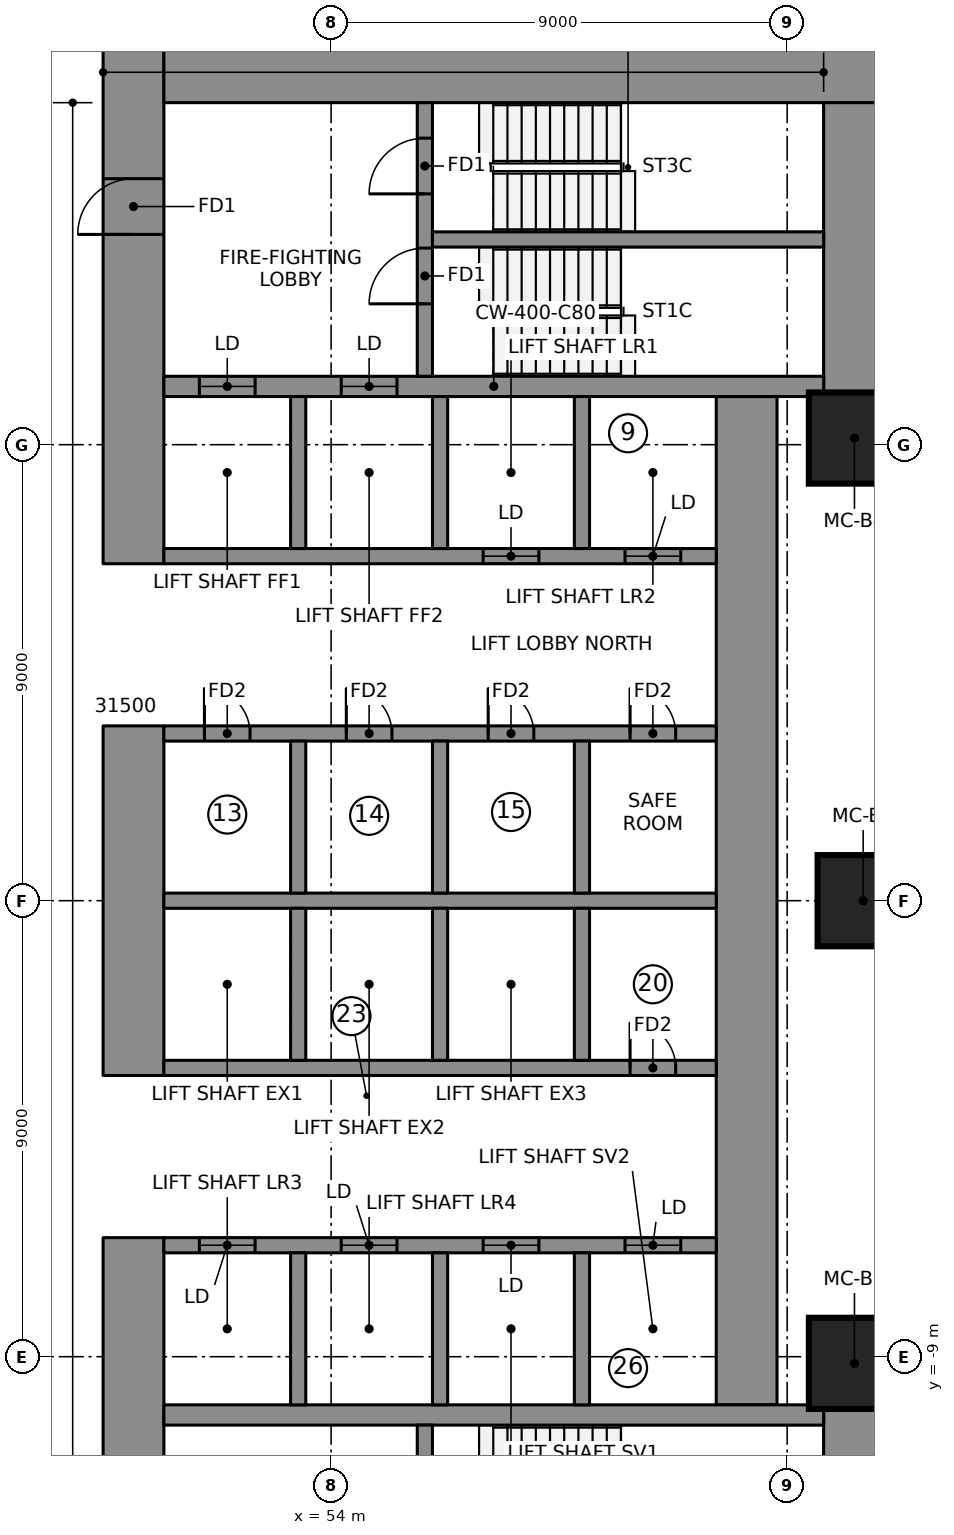
"""IFC4 building model, lengths in metres.
Left out: names, types, materials, properties, quantities, classifications, styles, units other than length and angle.
Written with IfcOpenShell. Run it as: python <this file> out.ifc"""

import sys

from ifc_helpers import new_model, si_unit, direction, frame, frame_2d, origin, origin_2d, place, context, subcontext, project, spatial, rectangle, extrude, element, fill, save


model = new_model("IFC4")
c1 = context("Model", 3, precision=1e-05, world=origin(), true_north=direction((0.0, 1.0)))
c2 = subcontext(c1, "Body", "Model", "MODEL_VIEW")
j1 = project(units=[si_unit("LENGTHUNIT", "METRE"), si_unit("PLANEANGLEUNIT", "RADIAN")], contexts=[c1])
p1 = place(None, origin())
s1 = spatial("IfcSite", under=j1, at=p1, CompositionType="ELEMENT")
p2 = place(p1, origin())
s2 = spatial("IfcBuilding", under=s1, at=p2, CompositionType="ELEMENT")
p3 = place(p2, frame((0.0, 0.0, 53.8)))
s3 = spatial("IfcBuildingStorey", under=s2, at=p3, CompositionType="ELEMENT", Elevation=53.8)
p4 = place(p3, frame((50.1, 6.65, 0.0), z_axis=(0.0, 0.0, 1.0), x_axis=(0.0, 1.0, 0.0)))
e1 = element("IfcWall", 1, at=p4, inside=s3, PredefinedType="SHEAR", context=c2, shape_type="SweptSolid", body=[
    extrude(rectangle(XDim=10.3, YDim=1.2, at=frame_2d((5.15, 0.0))), origin(), (0.0, 0.0, 1.0), 3.55),
])
p5 = place(p4, frame((6.5, 0.0, 0.0)))
e2 = element("IfcOpeningElement", 2, at=p5, cuts=e1, PredefinedType="OPENING", context=c2, shape_type="SweptSolid", body=[
    extrude(rectangle(XDim=1.1, YDim=2.1, at=frame_2d((0.55, 1.05))), frame((0.0, 0.61, 0.0), z_axis=(0.0, -1.0, 0.0), x_axis=(1.0, 0.0, 0.0)), (0.0, 0.0, 1.0), 1.22),
])
p6 = place(p3, frame((50.1, -3.45, 0.0), z_axis=(0.0, 0.0, 1.0), x_axis=(0.0, 1.0, 0.0)))
e3 = element("IfcWall", 3, at=p6, inside=s3, PredefinedType="SHEAR", context=c2, shape_type="SweptSolid", body=[
    extrude(rectangle(XDim=6.9, YDim=1.2, at=frame_2d((3.45, 0.0))), origin(), (0.0, 0.0, 1.0), 3.55),
])
p7 = place(p3, frame((50.1, -16.95, 0.0), z_axis=(0.0, 0.0, 1.0), x_axis=(0.0, 1.0, 0.0)))
e4 = element("IfcWall", 4, at=p7, inside=s3, PredefinedType="SHEAR", context=c2, shape_type="SweptSolid", body=[
    extrude(rectangle(XDim=10.3, YDim=1.2, at=frame_2d((5.15, 0.0))), origin(), (0.0, 0.0, 1.0), 3.55),
])
p8 = place(p7, frame((2.7, 0.0, 0.0)))
e5 = element("IfcOpeningElement", 5, at=p8, cuts=e4, PredefinedType="OPENING", context=c2, shape_type="SweptSolid", body=[
    extrude(rectangle(XDim=1.1, YDim=2.1, at=frame_2d((0.55, 1.05))), frame((0.0, 0.61, 0.0), z_axis=(0.0, -1.0, 0.0), x_axis=(1.0, 0.0, 0.0)), (0.0, 0.0, 1.0), 1.22),
])
p9 = place(p3, frame((50.7, 16.35, 0.0), z_axis=(0.0, 0.0, 1.0), x_axis=(1.0, 0.0, 0.0)))
e6 = element("IfcWall", 6, at=p9, inside=s3, PredefinedType="SHEAR", context=c2, shape_type="SweptSolid", body=[
    extrude(rectangle(XDim=14.22, YDim=1.2, at=frame_2d((7.11, 0.0))), origin(), (0.0, 0.0, 1.0), 3.55),
])
for number, where, z_axis, x_axis in (
    (7, (64.32, 9.95, 0.0), (0.0, 0.0, 1.0), (0.0, 1.0, 0.0)),
    (8, (64.32, -15.75, 0.0), (0.0, 0.0, 1.0), (0.0, 1.0, 0.0)),
):
    element("IfcWall", number, at=place(p3, frame(where, z_axis=z_axis, x_axis=x_axis)), inside=s3, PredefinedType="SHEAR", context=c2, shape_type="SweptSolid", body=[
        extrude(rectangle(XDim=5.8, YDim=1.2, at=frame_2d((2.9, 0.0))), origin(), (0.0, 0.0, 1.0), 3.55),
    ])
p10 = place(p3, frame((62.2, -9.95, 0.0), z_axis=(0.0, 0.0, 1.0), x_axis=(0.0, 1.0, 0.0)))
e9 = element("IfcWall", 9, at=p10, inside=s3, PredefinedType="SHEAR", context=c2, shape_type="SweptSolid", body=[
    extrude(rectangle(XDim=19.9, YDim=1.2, at=frame_2d((9.95, 0.0))), origin(), (0.0, 0.0, 1.0), 3.55),
])
p11 = place(p3, frame((50.7, 10.15, 0.0), z_axis=(0.0, 0.0, 1.0), x_axis=(1.0, 0.0, 0.0)))
e10 = element("IfcWall", 10, at=p11, inside=s3, PredefinedType="SHEAR", context=c2, shape_type="SweptSolid", body=[
    extrude(rectangle(XDim=13.02, YDim=0.4, at=frame_2d((6.51, 0.0))), origin(), (0.0, 0.0, 1.0), 3.55),
])
p12 = place(p11, frame((0.7, 0.0, 0.0)))
e11 = element("IfcOpeningElement", 11, at=p12, cuts=e10, PredefinedType="OPENING", context=c2, shape_type="SweptSolid", body=[
    extrude(rectangle(XDim=1.1, YDim=2.1, at=frame_2d((0.55, 1.05))), frame((0.0, 0.21, 0.0), z_axis=(0.0, -1.0, 0.0), x_axis=(1.0, 0.0, 0.0)), (0.0, 0.0, 1.0), 0.42),
])
p13 = place(p11, frame((3.5, 0.0, 0.0)))
e12 = element("IfcOpeningElement", 12, at=p13, cuts=e10, PredefinedType="OPENING", context=c2, shape_type="SweptSolid", body=[
    extrude(rectangle(XDim=1.1, YDim=2.1, at=frame_2d((0.55, 1.05))), frame((0.0, 0.21, 0.0), z_axis=(0.0, -1.0, 0.0), x_axis=(1.0, 0.0, 0.0)), (0.0, 0.0, 1.0), 0.42),
])
p14 = place(p3, frame((50.7, -10.15, 0.0), z_axis=(0.0, 0.0, 1.0), x_axis=(1.0, 0.0, 0.0)))
e13 = element("IfcWall", 13, at=p14, inside=s3, PredefinedType="SHEAR", context=c2, shape_type="SweptSolid", body=[
    extrude(rectangle(XDim=13.02, YDim=0.4, at=frame_2d((6.51, 0.0))), origin(), (0.0, 0.0, 1.0), 3.55),
])
p15 = place(p3, frame((50.7, 0.0, 0.0), z_axis=(0.0, 0.0, 1.0), x_axis=(1.0, 0.0, 0.0)))
e14 = element("IfcWall", 14, at=p15, inside=s3, PredefinedType="SHEAR", context=c2, shape_type="SweptSolid", body=[
    extrude(rectangle(XDim=10.9, YDim=0.3, at=frame_2d((5.45, 0.0))), origin(), (0.0, 0.0, 1.0), 3.55),
])
p16 = place(p3, frame((50.7, 3.3, 0.0), z_axis=(0.0, 0.0, 1.0), x_axis=(1.0, 0.0, 0.0)))
e15 = element("IfcWall", 15, at=p16, inside=s3, PredefinedType="SHEAR", context=c2, shape_type="SweptSolid", body=[
    extrude(rectangle(XDim=10.9, YDim=0.3, at=frame_2d((5.45, 0.0))), origin(), (0.0, 0.0, 1.0), 3.55),
])
p17 = place(p16, frame((0.8, 0.0, 0.0)))
e16 = element("IfcOpeningElement", 16, at=p17, cuts=e15, PredefinedType="OPENING", context=c2, shape_type="SweptSolid", body=[
    extrude(rectangle(XDim=0.9, YDim=2.1, at=frame_2d((0.45, 1.05))), frame((0.0, 0.16, 0.0), z_axis=(0.0, -1.0, 0.0), x_axis=(1.0, 0.0, 0.0)), (0.0, 0.0, 1.0), 0.32),
])
p18 = place(p16, frame((3.6, 0.0, 0.0)))
e17 = element("IfcOpeningElement", 17, at=p18, cuts=e15, PredefinedType="OPENING", context=c2, shape_type="SweptSolid", body=[
    extrude(rectangle(XDim=0.9, YDim=2.1, at=frame_2d((0.45, 1.05))), frame((0.0, 0.16, 0.0), z_axis=(0.0, -1.0, 0.0), x_axis=(1.0, 0.0, 0.0)), (0.0, 0.0, 1.0), 0.32),
])
p19 = place(p16, frame((6.4, 0.0, 0.0)))
e18 = element("IfcOpeningElement", 18, at=p19, cuts=e15, PredefinedType="OPENING", context=c2, shape_type="SweptSolid", body=[
    extrude(rectangle(XDim=0.9, YDim=2.1, at=frame_2d((0.45, 1.05))), frame((0.0, 0.16, 0.0), z_axis=(0.0, -1.0, 0.0), x_axis=(1.0, 0.0, 0.0)), (0.0, 0.0, 1.0), 0.32),
])
p20 = place(p16, frame((9.2, 0.0, 0.0)))
e19 = element("IfcOpeningElement", 19, at=p20, cuts=e15, PredefinedType="OPENING", context=c2, shape_type="SweptSolid", body=[
    extrude(rectangle(XDim=0.9, YDim=2.1, at=frame_2d((0.45, 1.05))), frame((0.0, 0.16, 0.0), z_axis=(0.0, -1.0, 0.0), x_axis=(1.0, 0.0, 0.0)), (0.0, 0.0, 1.0), 0.32),
])
p21 = place(p3, frame((50.7, 6.8, 0.0), z_axis=(0.0, 0.0, 1.0), x_axis=(1.0, 0.0, 0.0)))
e20 = element("IfcWall", 20, at=p21, inside=s3, PredefinedType="SHEAR", context=c2, shape_type="SweptSolid", body=[
    extrude(rectangle(XDim=10.9, YDim=0.3, at=frame_2d((5.45, 0.0))), origin(), (0.0, 0.0, 1.0), 3.55),
])
p22 = place(p21, frame((6.3, 0.0, 0.0)))
e21 = element("IfcOpeningElement", 21, at=p22, cuts=e20, PredefinedType="OPENING", context=c2, shape_type="SweptSolid", body=[
    extrude(rectangle(XDim=1.1, YDim=2.1, at=frame_2d((0.55, 1.05))), frame((0.0, 0.16, 0.0), z_axis=(0.0, -1.0, 0.0), x_axis=(1.0, 0.0, 0.0)), (0.0, 0.0, 1.0), 0.32),
])
p23 = place(p21, frame((9.1, 0.0, 0.0)))
e22 = element("IfcOpeningElement", 22, at=p23, cuts=e20, PredefinedType="OPENING", context=c2, shape_type="SweptSolid", body=[
    extrude(rectangle(XDim=1.1, YDim=2.1, at=frame_2d((0.55, 1.05))), frame((0.0, 0.16, 0.0), z_axis=(0.0, -1.0, 0.0), x_axis=(1.0, 0.0, 0.0)), (0.0, 0.0, 1.0), 0.32),
])
for number, where, z_axis, x_axis in (
    (23, (53.35, 0.15, 0.0), (0.0, 0.0, 1.0), (0.0, 1.0, 0.0)),
    (24, (53.35, 6.95, 0.0), (0.0, 0.0, 1.0), (0.0, 1.0, 0.0)),
    (25, (56.15, 0.15, 0.0), (0.0, 0.0, 1.0), (0.0, 1.0, 0.0)),
    (26, (56.15, 6.95, 0.0), (0.0, 0.0, 1.0), (0.0, 1.0, 0.0)),
    (27, (58.95, 0.15, 0.0), (0.0, 0.0, 1.0), (0.0, 1.0, 0.0)),
    (28, (58.95, 6.95, 0.0), (0.0, 0.0, 1.0), (0.0, 1.0, 0.0)),
):
    element("IfcWall", number, at=place(p3, frame(where, z_axis=z_axis, x_axis=x_axis)), inside=s3, PredefinedType="SHEAR", context=c2, shape_type="SweptSolid", body=[
        extrude(rectangle(XDim=3.0, YDim=0.3, at=frame_2d((1.5, 0.0))), origin(), (0.0, 0.0, 1.0), 3.55),
    ])
p24 = place(p3, frame((50.7, -3.3, 0.0), z_axis=(0.0, 0.0, 1.0), x_axis=(1.0, 0.0, 0.0)))
e29 = element("IfcWall", 29, at=p24, inside=s3, PredefinedType="SHEAR", context=c2, shape_type="SweptSolid", body=[
    extrude(rectangle(XDim=10.9, YDim=0.3, at=frame_2d((5.45, 0.0))), origin(), (0.0, 0.0, 1.0), 3.55),
])
p25 = place(p24, frame((9.2, 0.0, 0.0)))
e30 = element("IfcOpeningElement", 30, at=p25, cuts=e29, PredefinedType="OPENING", context=c2, shape_type="SweptSolid", body=[
    extrude(rectangle(XDim=0.9, YDim=2.1, at=frame_2d((0.45, 1.05))), frame((0.0, 0.16, 0.0), z_axis=(0.0, -1.0, 0.0), x_axis=(1.0, 0.0, 0.0)), (0.0, 0.0, 1.0), 0.32),
])
p26 = place(p3, frame((50.7, -6.8, 0.0), z_axis=(0.0, 0.0, 1.0), x_axis=(1.0, 0.0, 0.0)))
e31 = element("IfcWall", 31, at=p26, inside=s3, PredefinedType="SHEAR", context=c2, shape_type="SweptSolid", body=[
    extrude(rectangle(XDim=10.9, YDim=0.3, at=frame_2d((5.45, 0.0))), origin(), (0.0, 0.0, 1.0), 3.55),
])
p27 = place(p26, frame((0.7, 0.0, 0.0)))
e32 = element("IfcOpeningElement", 32, at=p27, cuts=e31, PredefinedType="OPENING", context=c2, shape_type="SweptSolid", body=[
    extrude(rectangle(XDim=1.1, YDim=2.1, at=frame_2d((0.55, 1.05))), frame((0.0, 0.16, 0.0), z_axis=(0.0, -1.0, 0.0), x_axis=(1.0, 0.0, 0.0)), (0.0, 0.0, 1.0), 0.32),
])
p28 = place(p26, frame((3.5, 0.0, 0.0)))
e33 = element("IfcOpeningElement", 33, at=p28, cuts=e31, PredefinedType="OPENING", context=c2, shape_type="SweptSolid", body=[
    extrude(rectangle(XDim=1.1, YDim=2.1, at=frame_2d((0.55, 1.05))), frame((0.0, 0.16, 0.0), z_axis=(0.0, -1.0, 0.0), x_axis=(1.0, 0.0, 0.0)), (0.0, 0.0, 1.0), 0.32),
])
p29 = place(p26, frame((6.3, 0.0, 0.0)))
e34 = element("IfcOpeningElement", 34, at=p29, cuts=e31, PredefinedType="OPENING", context=c2, shape_type="SweptSolid", body=[
    extrude(rectangle(XDim=1.1, YDim=2.1, at=frame_2d((0.55, 1.05))), frame((0.0, 0.16, 0.0), z_axis=(0.0, -1.0, 0.0), x_axis=(1.0, 0.0, 0.0)), (0.0, 0.0, 1.0), 0.32),
])
p30 = place(p26, frame((9.1, 0.0, 0.0)))
e35 = element("IfcOpeningElement", 35, at=p30, cuts=e31, PredefinedType="OPENING", context=c2, shape_type="SweptSolid", body=[
    extrude(rectangle(XDim=1.1, YDim=2.1, at=frame_2d((0.55, 1.05))), frame((0.0, 0.16, 0.0), z_axis=(0.0, -1.0, 0.0), x_axis=(1.0, 0.0, 0.0)), (0.0, 0.0, 1.0), 0.32),
])
for number, where, z_axis, x_axis in (
    (36, (53.35, -3.15, 0.0), (0.0, 0.0, 1.0), (0.0, 1.0, 0.0)),
    (37, (53.35, -9.95, 0.0), (0.0, 0.0, 1.0), (0.0, 1.0, 0.0)),
    (38, (56.15, -3.15, 0.0), (0.0, 0.0, 1.0), (0.0, 1.0, 0.0)),
    (39, (56.15, -9.95, 0.0), (0.0, 0.0, 1.0), (0.0, 1.0, 0.0)),
    (40, (58.95, -3.15, 0.0), (0.0, 0.0, 1.0), (0.0, 1.0, 0.0)),
    (41, (58.95, -9.95, 0.0), (0.0, 0.0, 1.0), (0.0, 1.0, 0.0)),
):
    element("IfcWall", number, at=place(p3, frame(where, z_axis=z_axis, x_axis=x_axis)), inside=s3, PredefinedType="SHEAR", context=c2, shape_type="SweptSolid", body=[
        extrude(rectangle(XDim=3.0, YDim=0.3, at=frame_2d((1.5, 0.0))), origin(), (0.0, 0.0, 1.0), 3.55),
    ])
p31 = place(p3, frame((55.85, 10.35, 0.0), z_axis=(0.0, 0.0, 1.0), x_axis=(0.0, 1.0, 0.0)))
e42 = element("IfcWall", 42, at=p31, inside=s3, PredefinedType="SHEAR", context=c2, shape_type="SweptSolid", body=[
    extrude(rectangle(XDim=5.4, YDim=0.3, at=frame_2d((2.7, 0.0))), origin(), (0.0, 0.0, 1.0), 3.55),
])
p32 = place(p31, frame((1.43, 0.0, 0.0)))
e43 = element("IfcOpeningElement", 43, at=p32, cuts=e42, PredefinedType="OPENING", context=c2, shape_type="SweptSolid", body=[
    extrude(rectangle(XDim=1.1, YDim=2.1, at=frame_2d((0.55, 1.05))), frame((0.0, 0.16, 0.0), z_axis=(0.0, -1.0, 0.0), x_axis=(1.0, 0.0, 0.0)), (0.0, 0.0, 1.0), 0.32),
])
p33 = place(p31, frame((3.6, 0.0, 0.0)))
e44 = element("IfcOpeningElement", 44, at=p33, cuts=e42, PredefinedType="OPENING", context=c2, shape_type="SweptSolid", body=[
    extrude(rectangle(XDim=1.1, YDim=2.1, at=frame_2d((0.55, 1.05))), frame((0.0, 0.16, 0.0), z_axis=(0.0, -1.0, 0.0), x_axis=(1.0, 0.0, 0.0)), (0.0, 0.0, 1.0), 0.32),
])
p34 = place(p3, frame((55.85, -15.75, 0.0), z_axis=(0.0, 0.0, 1.0), x_axis=(0.0, 1.0, 0.0)))
e45 = element("IfcWall", 45, at=p34, inside=s3, PredefinedType="SHEAR", context=c2, shape_type="SweptSolid", body=[
    extrude(rectangle(XDim=5.4, YDim=0.3, at=frame_2d((2.7, 0.0))), origin(), (0.0, 0.0, 1.0), 3.55),
])
p35 = place(p34, frame((3.6, 0.0, 0.0)))
e46 = element("IfcOpeningElement", 46, at=p35, cuts=e45, PredefinedType="OPENING", context=c2, shape_type="SweptSolid", body=[
    extrude(rectangle(XDim=1.1, YDim=2.1, at=frame_2d((0.55, 1.05))), frame((0.0, 0.16, 0.0), z_axis=(0.0, -1.0, 0.0), x_axis=(1.0, 0.0, 0.0)), (0.0, 0.0, 1.0), 0.32),
])
p36 = place(p34, frame((0.8, 0.0, 0.0)))
e47 = element("IfcOpeningElement", 47, at=p36, cuts=e45, PredefinedType="OPENING", context=c2, shape_type="SweptSolid", body=[
    extrude(rectangle(XDim=0.9, YDim=2.1, at=frame_2d((0.45, 1.05))), frame((0.0, 0.16, 0.0), z_axis=(0.0, -1.0, 0.0), x_axis=(1.0, 0.0, 0.0)), (0.0, 0.0, 1.0), 0.32),
])
p37 = place(p3, frame((56.0, 13.05, 0.0), z_axis=(0.0, 0.0, 1.0), x_axis=(1.0, 0.0, 0.0)))
e48 = element("IfcWall", 48, at=p37, inside=s3, PredefinedType="SHEAR", context=c2, shape_type="SweptSolid", body=[
    extrude(rectangle(XDim=7.72, YDim=0.3, at=frame_2d((3.86, 0.0))), origin(), (0.0, 0.0, 1.0), 3.55),
])
for number, where, z_axis, x_axis in (
    (49, (64.328, -9.131, 0.0), (0.0, 0.0, 1.0), (1.0, 0.0, 0.0)),
    (50, (64.5, 0.0, 0.0), (0.0, 0.0, 1.0), (1.0, 0.0, 0.0)),
    (51, (64.328, 9.131, 0.0), (0.0, 0.0, 1.0), (1.0, 0.0, 0.0)),
):
    element("IfcColumn", number, at=place(p3, frame(where, z_axis=z_axis, x_axis=x_axis)), inside=s3, PredefinedType="COLUMN", context=c2, shape_type="SweptSolid", body=[
        extrude(rectangle(XDim=1.8, YDim=1.8, at=origin_2d()), origin(), (0.0, 0.0, 1.0), 3.55),
    ])
p38 = place(p12, origin())
e52 = element("IfcDoor", 52, at=p38, inside=s3, OperationType="DOUBLE_DOOR_SLIDING", PredefinedType="DOOR", context=c2, shape_type="SweptSolid", body=[
    extrude(rectangle(XDim=1.1, YDim=2.1, at=frame_2d((0.55, 1.05))), frame((0.0, 0.025, 0.0), z_axis=(0.0, -1.0, 0.0), x_axis=(1.0, 0.0, 0.0)), (0.0, 0.0, 1.0), 0.05),
])
fill(e11, e52)
p39 = place(p13, origin())
e53 = element("IfcDoor", 53, at=p39, inside=s3, OperationType="DOUBLE_DOOR_SLIDING", PredefinedType="DOOR", context=c2, shape_type="SweptSolid", body=[
    extrude(rectangle(XDim=1.1, YDim=2.1, at=frame_2d((0.55, 1.05))), frame((0.0, 0.025, 0.0), z_axis=(0.0, -1.0, 0.0), x_axis=(1.0, 0.0, 0.0)), (0.0, 0.0, 1.0), 0.05),
])
fill(e12, e53)
p40 = place(p22, origin())
e54 = element("IfcDoor", 54, at=p40, inside=s3, OperationType="DOUBLE_DOOR_SLIDING", PredefinedType="DOOR", context=c2, shape_type="SweptSolid", body=[
    extrude(rectangle(XDim=1.1, YDim=2.1, at=frame_2d((0.55, 1.05))), frame((0.0, 0.025, 0.0), z_axis=(0.0, -1.0, 0.0), x_axis=(1.0, 0.0, 0.0)), (0.0, 0.0, 1.0), 0.05),
])
fill(e21, e54)
p41 = place(p23, origin())
e55 = element("IfcDoor", 55, at=p41, inside=s3, OperationType="DOUBLE_DOOR_SLIDING", PredefinedType="DOOR", context=c2, shape_type="SweptSolid", body=[
    extrude(rectangle(XDim=1.1, YDim=2.1, at=frame_2d((0.55, 1.05))), frame((0.0, 0.025, 0.0), z_axis=(0.0, -1.0, 0.0), x_axis=(1.0, 0.0, 0.0)), (0.0, 0.0, 1.0), 0.05),
])
fill(e22, e55)
p42 = place(p27, origin())
e56 = element("IfcDoor", 56, at=p42, inside=s3, OperationType="DOUBLE_DOOR_SLIDING", PredefinedType="DOOR", context=c2, shape_type="SweptSolid", body=[
    extrude(rectangle(XDim=1.1, YDim=2.1, at=frame_2d((0.55, 1.05))), frame((0.0, 0.025, 0.0), z_axis=(0.0, -1.0, 0.0), x_axis=(1.0, 0.0, 0.0)), (0.0, 0.0, 1.0), 0.05),
])
fill(e32, e56)
p43 = place(p28, origin())
e57 = element("IfcDoor", 57, at=p43, inside=s3, OperationType="DOUBLE_DOOR_SLIDING", PredefinedType="DOOR", context=c2, shape_type="SweptSolid", body=[
    extrude(rectangle(XDim=1.1, YDim=2.1, at=frame_2d((0.55, 1.05))), frame((0.0, 0.025, 0.0), z_axis=(0.0, -1.0, 0.0), x_axis=(1.0, 0.0, 0.0)), (0.0, 0.0, 1.0), 0.05),
])
fill(e33, e57)
p44 = place(p29, origin())
e58 = element("IfcDoor", 58, at=p44, inside=s3, OperationType="DOUBLE_DOOR_SLIDING", PredefinedType="DOOR", context=c2, shape_type="SweptSolid", body=[
    extrude(rectangle(XDim=1.1, YDim=2.1, at=frame_2d((0.55, 1.05))), frame((0.0, 0.025, 0.0), z_axis=(0.0, -1.0, 0.0), x_axis=(1.0, 0.0, 0.0)), (0.0, 0.0, 1.0), 0.05),
])
fill(e34, e58)
p45 = place(p30, origin())
e59 = element("IfcDoor", 59, at=p45, inside=s3, OperationType="DOUBLE_DOOR_SLIDING", PredefinedType="DOOR", context=c2, shape_type="SweptSolid", body=[
    extrude(rectangle(XDim=1.1, YDim=2.1, at=frame_2d((0.55, 1.05))), frame((0.0, 0.025, 0.0), z_axis=(0.0, -1.0, 0.0), x_axis=(1.0, 0.0, 0.0)), (0.0, 0.0, 1.0), 0.05),
])
fill(e35, e59)
p46 = place(p32, origin())
e60 = element("IfcDoor", 60, at=p46, inside=s3, OperationType="SINGLE_SWING_RIGHT", PredefinedType="DOOR", context=c2, shape_type="SweptSolid", body=[
    extrude(rectangle(XDim=1.1, YDim=2.1, at=frame_2d((0.55, 1.05))), frame((0.0, 0.025, 0.0), z_axis=(0.0, -1.0, 0.0), x_axis=(1.0, 0.0, 0.0)), (0.0, 0.0, 1.0), 0.05),
])
fill(e43, e60)
p47 = place(p33, origin())
e61 = element("IfcDoor", 61, at=p47, inside=s3, OperationType="SINGLE_SWING_RIGHT", PredefinedType="DOOR", context=c2, shape_type="SweptSolid", body=[
    extrude(rectangle(XDim=1.1, YDim=2.1, at=frame_2d((0.55, 1.05))), frame((0.0, 0.025, 0.0), z_axis=(0.0, -1.0, 0.0), x_axis=(1.0, 0.0, 0.0)), (0.0, 0.0, 1.0), 0.05),
])
fill(e44, e61)
p48 = place(p5, origin())
e62 = element("IfcDoor", 62, at=p48, inside=s3, OperationType="SINGLE_SWING_RIGHT", PredefinedType="DOOR", context=c2, shape_type="SweptSolid", body=[
    extrude(rectangle(XDim=1.1, YDim=2.1, at=frame_2d((0.55, 1.05))), frame((0.0, 0.025, 0.0), z_axis=(0.0, -1.0, 0.0), x_axis=(1.0, 0.0, 0.0)), (0.0, 0.0, 1.0), 0.05),
])
fill(e2, e62)
p49 = place(p17, origin())
e63 = element("IfcDoor", 63, at=p49, inside=s3, OperationType="SINGLE_SWING_LEFT", PredefinedType="DOOR", context=c2, shape_type="SweptSolid", body=[
    extrude(rectangle(XDim=0.9, YDim=2.1, at=frame_2d((0.45, 1.05))), frame((0.0, 0.025, 0.0), z_axis=(0.0, -1.0, 0.0), x_axis=(1.0, 0.0, 0.0)), (0.0, 0.0, 1.0), 0.05),
])
fill(e16, e63)
p50 = place(p18, origin())
e64 = element("IfcDoor", 64, at=p50, inside=s3, OperationType="SINGLE_SWING_LEFT", PredefinedType="DOOR", context=c2, shape_type="SweptSolid", body=[
    extrude(rectangle(XDim=0.9, YDim=2.1, at=frame_2d((0.45, 1.05))), frame((0.0, 0.025, 0.0), z_axis=(0.0, -1.0, 0.0), x_axis=(1.0, 0.0, 0.0)), (0.0, 0.0, 1.0), 0.05),
])
fill(e17, e64)
p51 = place(p19, origin())
e65 = element("IfcDoor", 65, at=p51, inside=s3, OperationType="SINGLE_SWING_LEFT", PredefinedType="DOOR", context=c2, shape_type="SweptSolid", body=[
    extrude(rectangle(XDim=0.9, YDim=2.1, at=frame_2d((0.45, 1.05))), frame((0.0, 0.025, 0.0), z_axis=(0.0, -1.0, 0.0), x_axis=(1.0, 0.0, 0.0)), (0.0, 0.0, 1.0), 0.05),
])
fill(e18, e65)
p52 = place(p20, origin())
e66 = element("IfcDoor", 66, at=p52, inside=s3, OperationType="SINGLE_SWING_LEFT", PredefinedType="DOOR", context=c2, shape_type="SweptSolid", body=[
    extrude(rectangle(XDim=0.9, YDim=2.1, at=frame_2d((0.45, 1.05))), frame((0.0, 0.025, 0.0), z_axis=(0.0, -1.0, 0.0), x_axis=(1.0, 0.0, 0.0)), (0.0, 0.0, 1.0), 0.05),
])
fill(e19, e66)
p53 = place(p25, origin())
e67 = element("IfcDoor", 67, at=p53, inside=s3, OperationType="SINGLE_SWING_LEFT", PredefinedType="DOOR", context=c2, shape_type="SweptSolid", body=[
    extrude(rectangle(XDim=0.9, YDim=2.1, at=frame_2d((0.45, 1.05))), frame((0.0, 0.025, 0.0), z_axis=(0.0, -1.0, 0.0), x_axis=(1.0, 0.0, 0.0)), (0.0, 0.0, 1.0), 0.05),
])
fill(e30, e67)
save(model, sys.argv[1])
